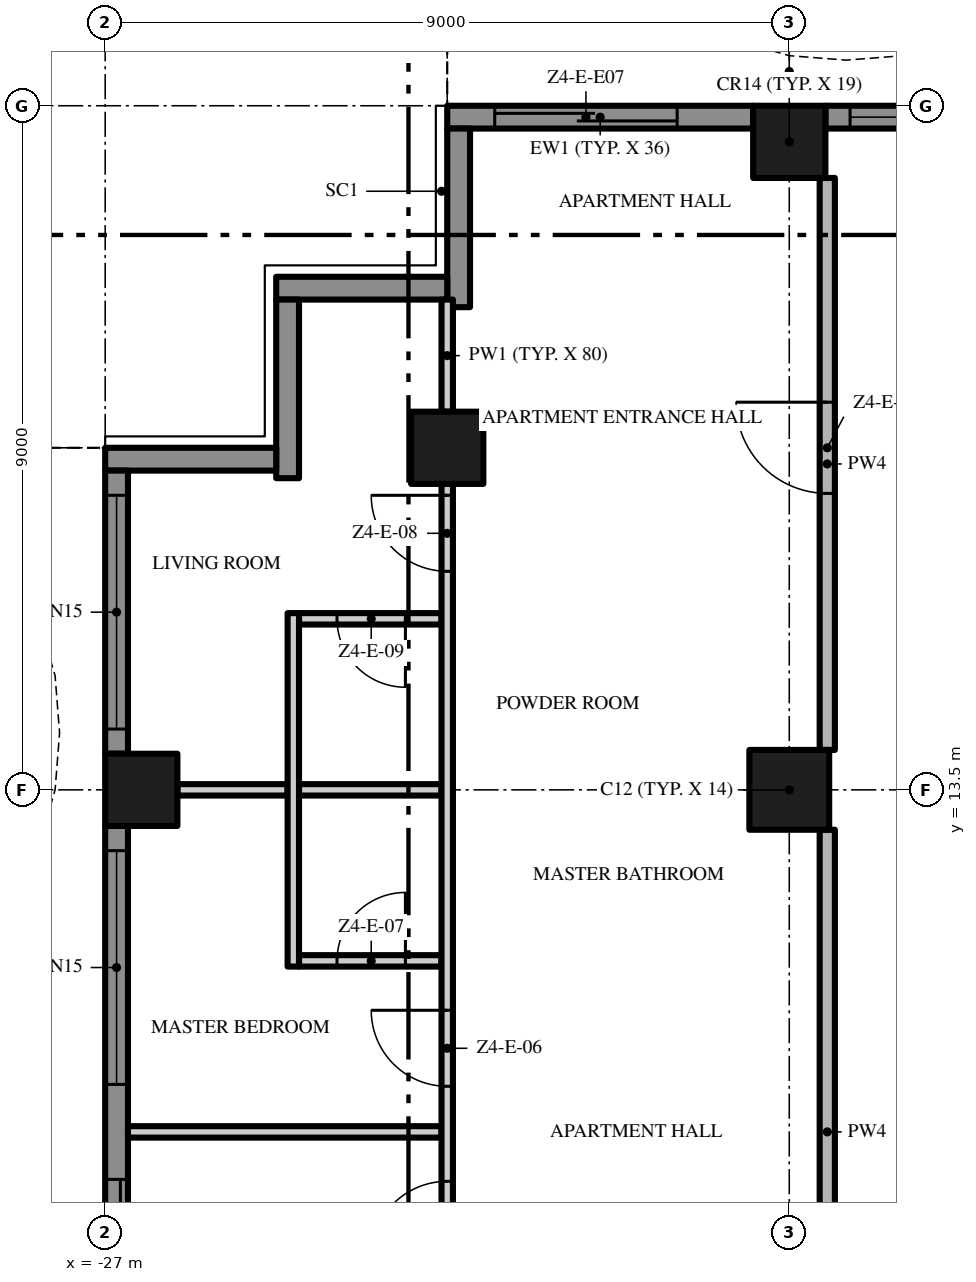
"""IFC4 building model, lengths in metres.
Left out: names, types, materials, properties, quantities, classifications, styles, units other than length and angle.
Written with IfcOpenShell. Run it as: python <this file> out.ifc"""

import sys

from ifc_helpers import new_model, si_unit, direction, frame, frame_2d, origin, origin_2d, place, context, subcontext, project, spatial, polyline, rectangle, outline, extrude, element, fill, save


model = new_model("IFC4")
c1 = context("Model", 3, precision=1e-05, world=origin(), true_north=direction((0.0, 1.0)))
c2 = subcontext(c1, "Body", "Model", "MODEL_VIEW")
j1 = project(units=[si_unit("LENGTHUNIT", "METRE"), si_unit("PLANEANGLEUNIT", "RADIAN")], contexts=[c1])
p1 = place(None, origin())
s1 = spatial("IfcSite", under=j1, at=p1, CompositionType="ELEMENT")
p2 = place(p1, origin())
s2 = spatial("IfcBuilding", under=s1, at=p2, CompositionType="ELEMENT")
p3 = place(p2, frame((0.0, 0.0, 226.2)))
s3 = spatial("IfcBuildingStorey", under=s2, at=p3, CompositionType="ELEMENT", Elevation=226.2)
p4 = place(p3, frame((-18.0, 13.5, 0.0), z_axis=(0.0, 0.0, 1.0), x_axis=(1.0, 0.0, 0.0)))
e1 = element("IfcColumn", 1, at=p4, inside=s3, PredefinedType="COLUMN", context=c2, shape_type="SweptSolid", body=[
    extrude(rectangle(XDim=1.05, YDim=1.05, at=origin_2d()), origin(), (0.0, 0.0, 1.0), 3.5),
])
for number, where, z_axis, x_axis in (
    (2, (-18.0, 22.025, 0.0), (0.0, 0.0, 1.0), (1.0, 0.0, 0.0)),
    (3, (-26.525, 13.5, 0.0), (0.0, 0.0, 1.0), (1.0, 0.0, 0.0)),
    (4, (-22.5, 18.0, 0.0), (0.0, 0.0, 1.0), (1.0, 0.0, 0.0)),
):
    element("IfcColumn", number, at=place(p3, frame(where, z_axis=z_axis, x_axis=x_axis)), inside=s3, PredefinedType="COLUMN", context=c2, shape_type="SweptSolid", body=[
        extrude(rectangle(XDim=0.95, YDim=0.95, at=origin_2d()), origin(), (0.0, 0.0, 1.0), 3.5),
    ])
p5 = place(p3, frame((-17.525, 22.35, 0.0), z_axis=(0.0, 0.0, 1.0), x_axis=(1.0, 0.0, 0.0)))
e5 = element("IfcWall", 5, at=p5, inside=s3, PredefinedType="SOLIDWALL", context=c2, shape_type="SweptSolid", body=[
    extrude(rectangle(XDim=4.025, YDim=0.3, at=frame_2d((2.013, 0.0))), origin(), (0.0, 0.0, 1.0), 3.5),
])
p6 = place(p5, frame((0.325, 0.0, 0.45)))
e6 = element("IfcOpeningElement", 6, at=p6, cuts=e5, PredefinedType="OPENING", context=c2, shape_type="SweptSolid", body=[
    extrude(rectangle(XDim=3.075, YDim=2.65, at=frame_2d((1.538, 1.325))), frame((0.0, 0.16, 0.0), z_axis=(0.0, -1.0, 0.0), x_axis=(1.0, 0.0, 0.0)), (0.0, 0.0, 1.0), 0.32),
])
p7 = place(p3, frame((-22.5, 22.35, 0.0), z_axis=(0.0, 0.0, 1.0), x_axis=(1.0, 0.0, 0.0)))
e7 = element("IfcWall", 7, at=p7, inside=s3, PredefinedType="SOLIDWALL", context=c2, shape_type="SweptSolid", body=[
    extrude(rectangle(XDim=4.025, YDim=0.3, at=frame_2d((2.013, 0.0))), origin(), (0.0, 0.0, 1.0), 3.5),
])
p8 = place(p7, frame((0.625, 0.0, 0.0)))
e8 = element("IfcOpeningElement", 8, at=p8, cuts=e7, PredefinedType="OPENING", context=c2, shape_type="SweptSolid", body=[
    extrude(rectangle(XDim=2.4, YDim=2.4, at=frame_2d((1.2, 1.2))), frame((0.0, 0.16, 0.0), z_axis=(0.0, -1.0, 0.0), x_axis=(1.0, 0.0, 0.0)), (0.0, 0.0, 1.0), 0.32),
])
p9 = place(p3, frame((-22.35, 19.85, 0.0), z_axis=(0.0, 0.0, 1.0), x_axis=(0.0, 1.0, 0.0)))
e9 = element("IfcWall", 9, at=p9, inside=s3, PredefinedType="SOLIDWALL", context=c2, shape_type="SweptSolid", body=[
    extrude(rectangle(XDim=2.35, YDim=0.3, at=frame_2d((1.175, 0.0))), origin(), (0.0, 0.0, 1.0), 3.5),
])
p10 = place(p3, frame((-24.75, 20.1, 0.0), z_axis=(0.0, 0.0, 1.0), x_axis=(1.0, 0.0, 0.0)))
e10 = element("IfcWall", 10, at=p10, inside=s3, PredefinedType="SOLIDWALL", context=c2, shape_type="SweptSolid", body=[
    extrude(rectangle(XDim=2.25, YDim=0.3, at=frame_2d((1.125, 0.0))), origin(), (0.0, 0.0, 1.0), 3.5),
])
p11 = place(p3, frame((-24.6, 17.6, 0.0), z_axis=(0.0, 0.0, 1.0), x_axis=(0.0, 1.0, 0.0)))
e11 = element("IfcWall", 11, at=p11, inside=s3, PredefinedType="SOLIDWALL", context=c2, shape_type="SweptSolid", body=[
    extrude(rectangle(XDim=2.35, YDim=0.3, at=frame_2d((1.175, 0.0))), origin(), (0.0, 0.0, 1.0), 3.5),
])
p12 = place(p3, frame((-27.0, 17.85, 0.0), z_axis=(0.0, 0.0, 1.0), x_axis=(1.0, 0.0, 0.0)))
e12 = element("IfcWall", 12, at=p12, inside=s3, PredefinedType="SOLIDWALL", context=c2, shape_type="SweptSolid", body=[
    extrude(rectangle(XDim=2.25, YDim=0.3, at=frame_2d((1.125, 0.0))), origin(), (0.0, 0.0, 1.0), 3.5),
])
p13 = place(p3, frame((-26.85, 13.975, 0.0), z_axis=(0.0, 0.0, 1.0), x_axis=(0.0, 1.0, 0.0)))
e13 = element("IfcWall", 13, at=p13, inside=s3, PredefinedType="SOLIDWALL", context=c2, shape_type="SweptSolid", body=[
    extrude(rectangle(XDim=3.725, YDim=0.3, at=frame_2d((1.863, 0.0))), origin(), (0.0, 0.0, 1.0), 3.5),
])
p14 = place(p13, frame((0.325, 0.0, 0.45)))
e14 = element("IfcOpeningElement", 14, at=p14, cuts=e13, PredefinedType="OPENING", context=c2, shape_type="SweptSolid", body=[
    extrude(rectangle(XDim=3.075, YDim=2.65, at=frame_2d((1.538, 1.325))), frame((0.0, 0.16, 0.0), z_axis=(0.0, -1.0, 0.0), x_axis=(1.0, 0.0, 0.0)), (0.0, 0.0, 1.0), 0.32),
])
p15 = place(p3, frame((-26.85, 4.975, 0.0), z_axis=(0.0, 0.0, 1.0), x_axis=(0.0, 1.0, 0.0)))
e15 = element("IfcWall", 15, at=p15, inside=s3, PredefinedType="SOLIDWALL", context=c2, shape_type="SweptSolid", body=[
    extrude(rectangle(XDim=8.05, YDim=0.3, at=frame_2d((4.025, 0.0))), origin(), (0.0, 0.0, 1.0), 3.5),
])
p16 = place(p15, frame((4.65, 0.0, 0.45)))
e16 = element("IfcOpeningElement", 16, at=p16, cuts=e15, PredefinedType="OPENING", context=c2, shape_type="SweptSolid", body=[
    extrude(rectangle(XDim=3.075, YDim=2.65, at=frame_2d((1.538, 1.325))), frame((0.0, 0.16, 0.0), z_axis=(0.0, -1.0, 0.0), x_axis=(1.0, 0.0, 0.0)), (0.0, 0.0, 1.0), 0.32),
])
p17 = place(p15, frame((0.325, 0.0, 0.0)))
e17 = element("IfcOpeningElement", 17, at=p17, cuts=e15, PredefinedType="OPENING", context=c2, shape_type="SweptSolid", body=[
    extrude(rectangle(XDim=3.075, YDim=2.4, at=frame_2d((1.538, 1.2))), frame((0.0, 0.16, 0.0), z_axis=(0.0, -1.0, 0.0), x_axis=(1.0, 0.0, 0.0)), (0.0, 0.0, 1.0), 0.32),
])
p18 = place(p3, origin())
e18 = element("IfcWall", 18, at=p18, inside=s3, PredefinedType="USERDEFINED", context=c2, shape_type="SweptSolid", body=[
    extrude(outline(polyline([(-13.5, 24.3), (-15.0, 23.595), (-16.5, 23.159), (-17.25, 23.1), (-18.0, 23.159), (-19.5, 23.595), (-21.0, 24.3), (-22.5, 25.005), (-22.606, 24.779), (-21.106, 24.074), (-19.589, 23.36), (-18.045, 22.911), (-17.25, 22.849), (-16.455, 22.911), (-14.911, 23.36), (-13.394, 24.074), (-13.5, 24.3)])), origin(), (0.0, 0.0, 1.0), 0.9),
])
p19 = place(p3, origin())
e19 = element("IfcWall", 19, at=p19, inside=s3, PredefinedType="USERDEFINED", context=c2, shape_type="SweptSolid", body=[
    extrude(outline(polyline([(-28.8, 18.0), (-28.095, 16.5), (-27.659, 15.0), (-27.6, 14.25), (-27.659, 13.5), (-28.095, 12.0), (-28.8, 10.5), (-29.505, 9.0), (-29.941, 7.5), (-30.0, 6.75), (-29.941, 6.0), (-29.505, 4.5), (-28.8, 3.0), (-28.095, 1.5), (-27.659, 0.0), (-27.6, -0.75), (-27.659, -1.5), (-28.095, -3.0), (-28.8, -4.5), (-29.505, -6.0), (-29.941, -7.5), (-30.0, -8.25), (-29.941, -9.0), (-29.505, -10.5), (-28.8, -12.0), (-28.095, -13.5), (-27.659, -15.0), (-27.6, -15.75), (-27.659, -16.5), (-28.095, -18.0), (-27.855, -18.07), (-27.411, -16.545), (-27.349, -15.75), (-27.411, -14.955), (-27.86, -13.411), (-28.574, -11.894), (-29.271, -10.411), (-29.694, -8.955), (-29.749, -8.25), (-29.694, -7.545), (-29.271, -6.089), (-28.574, -4.606), (-27.86, -3.089), (-27.411, -1.545), (-27.349, -0.75), (-27.411, 0.045), (-27.86, 1.589), (-28.574, 3.106), (-29.271, 4.589), (-29.694, 6.045), (-29.749, 6.75), (-29.694, 7.455), (-29.271, 8.911), (-28.574, 10.394), (-27.86, 11.911), (-27.411, 13.455), (-27.349, 14.25), (-27.411, 15.045), (-27.86, 16.589), (-28.574, 18.106), (-28.8, 18.0)])), origin(), (0.0, 0.0, 1.0), 0.9),
])
p20 = place(p3, frame((-26.7, 9.0, 0.0), z_axis=(0.0, 0.0, 1.0), x_axis=(1.0, 0.0, 0.0)))
e20 = element("IfcWall", 20, at=p20, inside=s3, PredefinedType="PARTITIONING", context=c2, shape_type="SweptSolid", body=[
    extrude(rectangle(XDim=4.125, YDim=0.15, at=frame_2d((2.062, 0.0))), origin(), (0.0, 0.0, 1.0), 3.5),
])
p21 = place(p3, frame((-24.45, 11.25, 0.0), z_axis=(0.0, 0.0, 1.0), x_axis=(1.0, 0.0, 0.0)))
e21 = element("IfcWall", 21, at=p21, inside=s3, PredefinedType="PARTITIONING", context=c2, shape_type="SweptSolid", body=[
    extrude(rectangle(XDim=1.875, YDim=0.15, at=frame_2d((0.938, 0.0))), origin(), (0.0, 0.0, 1.0), 3.5),
])
p22 = place(p21, frame((0.5, 0.0, 0.0)))
e22 = element("IfcOpeningElement", 22, at=p22, cuts=e21, PredefinedType="OPENING", context=c2, shape_type="SweptSolid", body=[
    extrude(rectangle(XDim=0.9, YDim=2.1, at=frame_2d((0.45, 1.05))), frame((0.0, 0.085, 0.0), z_axis=(0.0, -1.0, 0.0), x_axis=(1.0, 0.0, 0.0)), (0.0, 0.0, 1.0), 0.17),
])
p23 = place(p3, frame((-26.05, 13.5, 0.0), z_axis=(0.0, 0.0, 1.0), x_axis=(1.0, 0.0, 0.0)))
e23 = element("IfcWall", 23, at=p23, inside=s3, PredefinedType="PARTITIONING", context=c2, shape_type="SweptSolid", body=[
    extrude(rectangle(XDim=1.45, YDim=0.15, at=frame_2d((0.725, 0.0))), origin(), (0.0, 0.0, 1.0), 3.5),
])
p24 = place(p3, frame((-24.45, 13.5, 0.0), z_axis=(0.0, 0.0, 1.0), x_axis=(1.0, 0.0, 0.0)))
e24 = element("IfcWall", 24, at=p24, inside=s3, PredefinedType="PARTITIONING", context=c2, shape_type="SweptSolid", body=[
    extrude(rectangle(XDim=1.875, YDim=0.15, at=frame_2d((0.938, 0.0))), origin(), (0.0, 0.0, 1.0), 3.5),
])
p25 = place(p3, frame((-22.575, 15.75, 0.0), z_axis=(0.0, 0.0, 1.0), x_axis=(-1.0, 0.0, 0.0)))
e25 = element("IfcWall", 25, at=p25, inside=s3, PredefinedType="PARTITIONING", context=c2, shape_type="SweptSolid", body=[
    extrude(rectangle(XDim=1.875, YDim=0.15, at=frame_2d((0.938, 0.0))), origin(), (0.0, 0.0, 1.0), 3.5),
])
p26 = place(p25, frame((0.475, 0.0, 0.0)))
e26 = element("IfcOpeningElement", 26, at=p26, cuts=e25, PredefinedType="OPENING", context=c2, shape_type="SweptSolid", body=[
    extrude(rectangle(XDim=0.9, YDim=2.1, at=frame_2d((0.45, 1.05))), frame((0.0, 0.085, 0.0), z_axis=(0.0, -1.0, 0.0), x_axis=(1.0, 0.0, 0.0)), (0.0, 0.0, 1.0), 0.17),
])
p27 = place(p3, frame((-24.525, 11.175, 0.0), z_axis=(0.0, 0.0, 1.0), x_axis=(0.0, 1.0, 0.0)))
e27 = element("IfcWall", 27, at=p27, inside=s3, PredefinedType="PARTITIONING", context=c2, shape_type="SweptSolid", body=[
    extrude(rectangle(XDim=4.65, YDim=0.15, at=frame_2d((2.325, 0.0))), origin(), (0.0, 0.0, 1.0), 3.5),
])
p28 = place(p3, frame((-22.5, 0.1, 0.0), z_axis=(0.0, 0.0, 1.0), x_axis=(0.0, 1.0, 0.0)))
e28 = element("IfcWall", 28, at=p28, inside=s3, PredefinedType="PARTITIONING", context=c2, shape_type="SweptSolid", body=[
    extrude(rectangle(XDim=17.425, YDim=0.15, at=frame_2d((8.713, 0.0))), origin(), (0.0, 0.0, 1.0), 3.5),
])
p29 = place(p28, frame((1.65, 0.0, 0.0)))
e29 = element("IfcOpeningElement", 29, at=p29, cuts=e28, PredefinedType="OPENING", context=c2, shape_type="SweptSolid", body=[
    extrude(rectangle(XDim=1.0, YDim=2.4, at=frame_2d((0.5, 1.2))), frame((0.0, 0.085, 0.0), z_axis=(0.0, -1.0, 0.0), x_axis=(1.0, 0.0, 0.0)), (0.0, 0.0, 1.0), 0.17),
])
p30 = place(p28, frame((7.25, 0.0, 0.0)))
e30 = element("IfcOpeningElement", 30, at=p30, cuts=e28, PredefinedType="OPENING", context=c2, shape_type="SweptSolid", body=[
    extrude(rectangle(XDim=1.0, YDim=2.4, at=frame_2d((0.5, 1.2))), frame((0.0, 0.085, 0.0), z_axis=(0.0, -1.0, 0.0), x_axis=(1.0, 0.0, 0.0)), (0.0, 0.0, 1.0), 0.17),
])
p31 = place(p28, frame((9.5, 0.0, 0.0)))
e31 = element("IfcOpeningElement", 31, at=p31, cuts=e28, PredefinedType="OPENING", context=c2, shape_type="SweptSolid", body=[
    extrude(rectangle(XDim=1.0, YDim=2.4, at=frame_2d((0.5, 1.2))), frame((0.0, 0.085, 0.0), z_axis=(0.0, -1.0, 0.0), x_axis=(1.0, 0.0, 0.0)), (0.0, 0.0, 1.0), 0.17),
])
p32 = place(p28, frame((16.275, 0.0, 0.0)))
e32 = element("IfcOpeningElement", 32, at=p32, cuts=e28, PredefinedType="OPENING", context=c2, shape_type="SweptSolid", body=[
    extrude(rectangle(XDim=1.0, YDim=2.4, at=frame_2d((0.5, 1.2))), frame((0.0, 0.085, 0.0), z_axis=(0.0, -1.0, 0.0), x_axis=(1.0, 0.0, 0.0)), (0.0, 0.0, 1.0), 0.17),
])
p33 = place(p3, frame((-22.5, 18.475, 0.0), z_axis=(0.0, 0.0, 1.0), x_axis=(0.0, 1.0, 0.0)))
e33 = element("IfcWall", 33, at=p33, inside=s3, PredefinedType="PARTITIONING", context=c2, shape_type="SweptSolid", body=[
    extrude(rectangle(XDim=1.475, YDim=0.15, at=frame_2d((0.738, 0.0))), origin(), (0.0, 0.0, 1.0), 3.5),
])
p34 = place(p3, frame((-17.5, 5.025, 0.0), z_axis=(0.0, 0.0, 1.0), x_axis=(0.0, 1.0, 0.0)))
e34 = element("IfcWall", 34, at=p34, inside=s3, PredefinedType="PARTITIONING", context=c2, shape_type="SweptSolid", body=[
    extrude(rectangle(XDim=7.95, YDim=0.2, at=frame_2d((3.975, 0.0))), origin(), (0.0, 0.0, 1.0), 3.5),
])
p35 = place(p3, frame((-17.5, 14.025, 0.0), z_axis=(0.0, 0.0, 1.0), x_axis=(0.0, 1.0, 0.0)))
e35 = element("IfcWall", 35, at=p35, inside=s3, PredefinedType="PARTITIONING", context=c2, shape_type="SweptSolid", body=[
    extrude(rectangle(XDim=7.525, YDim=0.2, at=frame_2d((3.763, 0.0))), origin(), (0.0, 0.0, 1.0), 3.5),
])
p36 = place(p35, frame((3.375, 0.0, 0.0)))
e36 = element("IfcOpeningElement", 36, at=p36, cuts=e35, PredefinedType="OPENING", context=c2, shape_type="SweptSolid", body=[
    extrude(rectangle(XDim=1.2, YDim=2.4, at=frame_2d((0.6, 1.2))), frame((0.0, 0.11, 0.0), z_axis=(0.0, -1.0, 0.0), x_axis=(1.0, 0.0, 0.0)), (0.0, 0.0, 1.0), 0.22),
])
p37 = place(p6, origin())
e37 = element("IfcWindow", 37, at=p37, inside=s3, PartitioningType="SINGLE_PANEL", PredefinedType="WINDOW", context=c2, shape_type="SweptSolid", body=[
    extrude(rectangle(XDim=3.075, YDim=2.65, at=frame_2d((1.538, 1.325))), frame((0.0, 0.03, 0.0), z_axis=(0.0, -1.0, 0.0), x_axis=(1.0, 0.0, 0.0)), (0.0, 0.0, 1.0), 0.06),
])
fill(e6, e37)
p38 = place(p8, origin())
e38 = element("IfcDoor", 38, at=p38, inside=s3, OperationType="SINGLE_SWING_LEFT", PredefinedType="DOOR", context=c2, shape_type="SweptSolid", body=[
    extrude(rectangle(XDim=2.4, YDim=2.4, at=frame_2d((1.2, 1.2))), frame((0.0, 0.025, 0.0), z_axis=(0.0, -1.0, 0.0), x_axis=(1.0, 0.0, 0.0)), (0.0, 0.0, 1.0), 0.05),
])
fill(e8, e38)
p39 = place(p14, origin())
e39 = element("IfcWindow", 39, at=p39, inside=s3, PartitioningType="SINGLE_PANEL", PredefinedType="WINDOW", context=c2, shape_type="SweptSolid", body=[
    extrude(rectangle(XDim=3.075, YDim=2.65, at=frame_2d((1.538, 1.325))), frame((0.0, 0.03, 0.0), z_axis=(0.0, -1.0, 0.0), x_axis=(1.0, 0.0, 0.0)), (0.0, 0.0, 1.0), 0.06),
])
fill(e14, e39)
p40 = place(p16, origin())
e40 = element("IfcWindow", 40, at=p40, inside=s3, PartitioningType="SINGLE_PANEL", PredefinedType="WINDOW", context=c2, shape_type="SweptSolid", body=[
    extrude(rectangle(XDim=3.075, YDim=2.65, at=frame_2d((1.538, 1.325))), frame((0.0, 0.03, 0.0), z_axis=(0.0, -1.0, 0.0), x_axis=(1.0, 0.0, 0.0)), (0.0, 0.0, 1.0), 0.06),
])
fill(e16, e40)
p41 = place(p17, origin())
e41 = element("IfcDoor", 41, at=p41, inside=s3, OperationType="SINGLE_SWING_LEFT", PredefinedType="DOOR", context=c2, shape_type="SweptSolid", body=[
    extrude(rectangle(XDim=3.075, YDim=2.4, at=frame_2d((1.538, 1.2))), frame((0.0, 0.025, 0.0), z_axis=(0.0, -1.0, 0.0), x_axis=(1.0, 0.0, 0.0)), (0.0, 0.0, 1.0), 0.05),
])
fill(e17, e41)
p42 = place(p36, origin())
e42 = element("IfcDoor", 42, at=p42, inside=s3, OperationType="SINGLE_SWING_RIGHT", PredefinedType="DOOR", context=c2, shape_type="SweptSolid", body=[
    extrude(rectangle(XDim=1.2, YDim=2.4, at=frame_2d((0.6, 1.2))), frame((0.0, 0.025, 0.0), z_axis=(0.0, -1.0, 0.0), x_axis=(1.0, 0.0, 0.0)), (0.0, 0.0, 1.0), 0.05),
])
fill(e36, e42)
p43 = place(p30, origin())
e43 = element("IfcDoor", 43, at=p43, inside=s3, OperationType="SINGLE_SWING_LEFT", PredefinedType="DOOR", context=c2, shape_type="SweptSolid", body=[
    extrude(rectangle(XDim=1.0, YDim=2.4, at=frame_2d((0.5, 1.2))), frame((0.0, 0.025, 0.0), z_axis=(0.0, -1.0, 0.0), x_axis=(1.0, 0.0, 0.0)), (0.0, 0.0, 1.0), 0.05),
])
fill(e30, e43)
p44 = place(p31, origin())
e44 = element("IfcDoor", 44, at=p44, inside=s3, OperationType="SINGLE_SWING_RIGHT", PredefinedType="DOOR", context=c2, shape_type="SweptSolid", body=[
    extrude(rectangle(XDim=1.0, YDim=2.4, at=frame_2d((0.5, 1.2))), frame((0.0, 0.025, 0.0), z_axis=(0.0, -1.0, 0.0), x_axis=(1.0, 0.0, 0.0)), (0.0, 0.0, 1.0), 0.05),
])
fill(e31, e44)
p45 = place(p22, origin())
e45 = element("IfcDoor", 45, at=p45, inside=s3, OperationType="SINGLE_SWING_RIGHT", PredefinedType="DOOR", context=c2, shape_type="SweptSolid", body=[
    extrude(rectangle(XDim=0.9, YDim=2.1, at=frame_2d((0.45, 1.05))), frame((0.0, 0.025, 0.0), z_axis=(0.0, -1.0, 0.0), x_axis=(1.0, 0.0, 0.0)), (0.0, 0.0, 1.0), 0.05),
])
fill(e22, e45)
p46 = place(p32, origin())
e46 = element("IfcDoor", 46, at=p46, inside=s3, OperationType="SINGLE_SWING_RIGHT", PredefinedType="DOOR", context=c2, shape_type="SweptSolid", body=[
    extrude(rectangle(XDim=1.0, YDim=2.4, at=frame_2d((0.5, 1.2))), frame((0.0, 0.025, 0.0), z_axis=(0.0, -1.0, 0.0), x_axis=(1.0, 0.0, 0.0)), (0.0, 0.0, 1.0), 0.05),
])
fill(e32, e46)
p47 = place(p26, origin())
e47 = element("IfcDoor", 47, at=p47, inside=s3, OperationType="SINGLE_SWING_LEFT", PredefinedType="DOOR", context=c2, shape_type="SweptSolid", body=[
    extrude(rectangle(XDim=0.9, YDim=2.1, at=frame_2d((0.45, 1.05))), frame((0.0, 0.025, 0.0), z_axis=(0.0, -1.0, 0.0), x_axis=(1.0, 0.0, 0.0)), (0.0, 0.0, 1.0), 0.05),
])
fill(e26, e47)
save(model, sys.argv[1])
